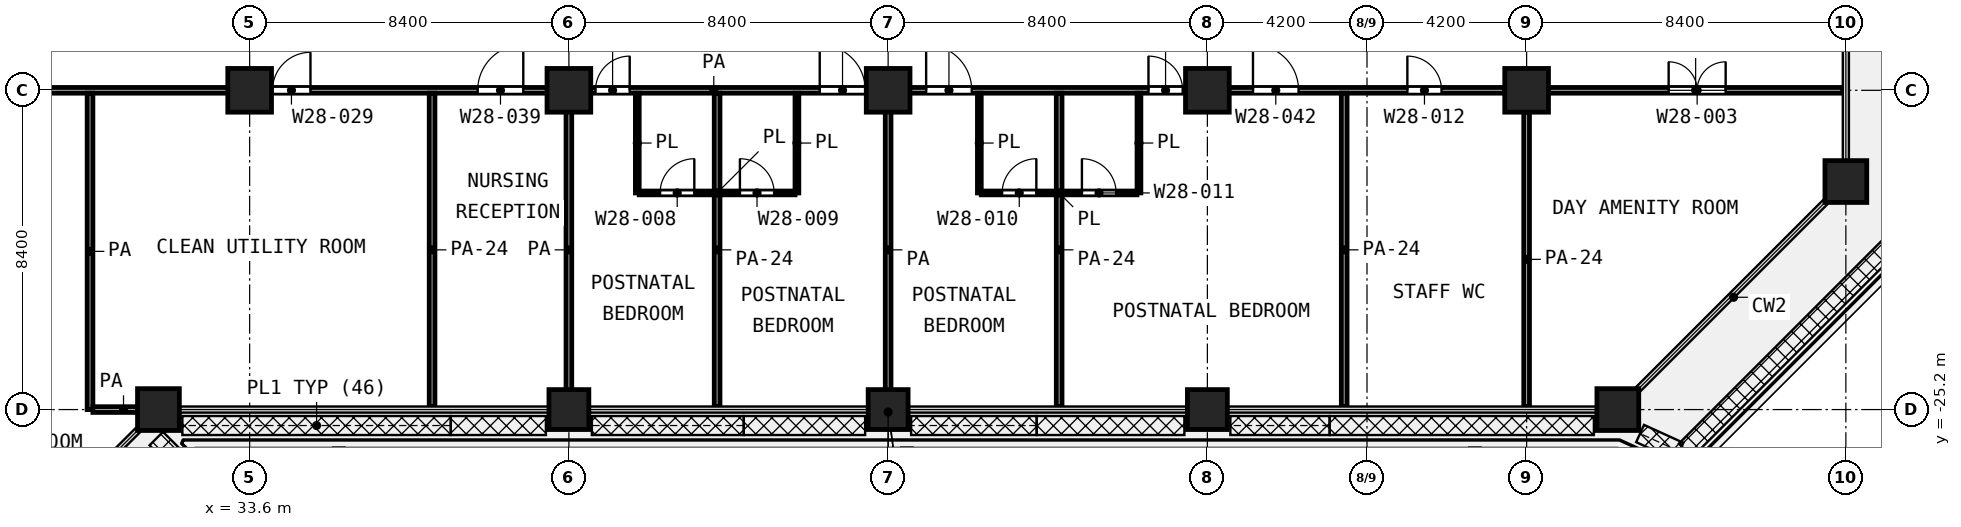
"""IFC4 building model, lengths in metres.
Left out: names, types, materials, properties, quantities, classifications, styles, units other than length and angle.
Written with IfcOpenShell. Run it as: python <this file> out.ifc"""

import sys

from ifc_helpers import new_model, si_unit, direction, frame, frame_2d, origin, origin_2d, place, context, subcontext, project, spatial, rectangle, extrude, element, fill, save


model = new_model("IFC4")
c1 = context("Model", 3, precision=1e-05, world=origin(), true_north=direction((0.0, 1.0)))
c2 = subcontext(c1, "Body", "Model", "MODEL_VIEW")
j1 = project(units=[si_unit("LENGTHUNIT", "METRE"), si_unit("PLANEANGLEUNIT", "RADIAN")], contexts=[c1])
p1 = place(None, origin())
s1 = spatial("IfcSite", under=j1, at=p1, CompositionType="ELEMENT")
p2 = place(p1, origin())
s2 = spatial("IfcBuilding", under=s1, at=p2, CompositionType="ELEMENT")
p3 = place(p2, frame((0.0, 0.0, 145.0)))
s3 = spatial("IfcBuildingStorey", under=s2, at=p3, CompositionType="ELEMENT", Elevation=145.0)
for number, where, z_axis, x_axis in (
    (1, (33.6, -16.8, 0.0), (0.0, 0.0, 1.0), (1.0, 0.0, 0.0)),
    (2, (42.0, -16.8, 0.0), (0.0, 0.0, 1.0), (1.0, 0.0, 0.0)),
    (3, (50.4, -16.8, 0.0), (0.0, 0.0, 1.0), (1.0, 0.0, 0.0)),
    (4, (58.8, -16.8, 0.0), (0.0, 0.0, 1.0), (1.0, 0.0, 0.0)),
    (5, (67.2, -16.8, 0.0), (0.0, 0.0, 1.0), (1.0, 0.0, 0.0)),
):
    element("IfcColumn", number, at=place(p3, frame(where, z_axis=z_axis, x_axis=x_axis)), inside=s3, PredefinedType="COLUMN", context=c2, shape_type="SweptSolid", body=[
        extrude(rectangle(XDim=1.15, YDim=1.15, at=origin_2d()), origin(), (0.0, 0.0, 1.0), 4.2),
    ])
for number, where, z_axis, x_axis in (
    (6, (75.6, -19.2, 0.0), (0.0, 0.0, 1.0), (1.0, 0.0, 0.0)),
    (7, (31.2, -25.2, 0.0), (0.0, 0.0, 1.0), (1.0, 0.0, 0.0)),
):
    element("IfcColumn", number, at=place(p3, frame(where, z_axis=z_axis, x_axis=x_axis)), inside=s3, PredefinedType="COLUMN", context=c2, shape_type="SweptSolid", body=[
        extrude(rectangle(XDim=1.1, YDim=1.1, at=origin_2d()), origin(), (0.0, 0.0, 1.0), 4.2),
    ])
for number, where, z_axis, x_axis in (
    (8, (42.0, -25.2, 0.0), (0.0, 0.0, 1.0), (1.0, 0.0, 0.0)),
    (9, (50.4, -25.2, 0.0), (0.0, 0.0, 1.0), (1.0, 0.0, 0.0)),
    (10, (58.8, -25.2, 0.0), (0.0, 0.0, 1.0), (1.0, 0.0, 0.0)),
):
    element("IfcColumn", number, at=place(p3, frame(where, z_axis=z_axis, x_axis=x_axis)), inside=s3, PredefinedType="COLUMN", context=c2, shape_type="SweptSolid", body=[
        extrude(rectangle(XDim=1.05, YDim=1.05, at=origin_2d()), origin(), (0.0, 0.0, 1.0), 4.2),
    ])
p4 = place(p3, frame((69.6, -25.2, 0.0), z_axis=(0.0, 0.0, 1.0), x_axis=(1.0, 0.0, 0.0)))
e11 = element("IfcColumn", 11, at=p4, inside=s3, PredefinedType="COLUMN", context=c2, shape_type="SweptSolid", body=[
    extrude(rectangle(XDim=1.1, YDim=1.1, at=origin_2d()), origin(), (0.0, 0.0, 1.0), 4.2),
])
p5 = place(p3, frame((43.85, -19.5, 0.0), z_axis=(0.0, 0.0, 1.0), x_axis=(1.0, 0.0, 0.0)))
e12 = element("IfcWall", 12, at=p5, inside=s3, PredefinedType="PARTITIONING", context=c2, shape_type="SweptSolid", body=[
    extrude(rectangle(XDim=4.1, YDim=0.1, at=frame_2d((2.05, 0.0))), origin(), (0.0, 0.0, 1.0), 3.6),
])
p6 = place(p5, frame((0.55, 0.0, 0.0)))
e13 = element("IfcOpeningElement", 13, at=p6, cuts=e12, PredefinedType="OPENING", context=c2, shape_type="SweptSolid", body=[
    extrude(rectangle(XDim=0.9, YDim=2.1, at=frame_2d((0.45, 1.05))), frame((0.0, 0.06, 0.0), z_axis=(0.0, -1.0, 0.0), x_axis=(1.0, 0.0, 0.0)), (0.0, 0.0, 1.0), 0.12),
])
p7 = place(p5, frame((2.65, 0.0, 0.0)))
e14 = element("IfcOpeningElement", 14, at=p7, cuts=e12, PredefinedType="OPENING", context=c2, shape_type="SweptSolid", body=[
    extrude(rectangle(XDim=0.9, YDim=2.1, at=frame_2d((0.45, 1.05))), frame((0.0, 0.06, 0.0), z_axis=(0.0, -1.0, 0.0), x_axis=(1.0, 0.0, 0.0)), (0.0, 0.0, 1.0), 0.12),
])
p8 = place(p3, frame((52.85, -19.5, 0.0), z_axis=(0.0, 0.0, 1.0), x_axis=(1.0, 0.0, 0.0)))
e15 = element("IfcWall", 15, at=p8, inside=s3, PredefinedType="PARTITIONING", context=c2, shape_type="SweptSolid", body=[
    extrude(rectangle(XDim=4.098, YDim=0.1, at=frame_2d((2.049, 0.0))), origin(), (0.0, 0.0, 1.0), 3.6),
])
p9 = place(p8, frame((0.55, 0.0, 0.0)))
e16 = element("IfcOpeningElement", 16, at=p9, cuts=e15, PredefinedType="OPENING", context=c2, shape_type="SweptSolid", body=[
    extrude(rectangle(XDim=0.9, YDim=2.1, at=frame_2d((0.45, 1.05))), frame((0.0, 0.06, 0.0), z_axis=(0.0, -1.0, 0.0), x_axis=(1.0, 0.0, 0.0)), (0.0, 0.0, 1.0), 0.12),
])
p10 = place(p8, frame((2.649, 0.0, 0.0)))
e17 = element("IfcOpeningElement", 17, at=p10, cuts=e15, PredefinedType="OPENING", context=c2, shape_type="SweptSolid", body=[
    extrude(rectangle(XDim=0.9, YDim=2.1, at=frame_2d((0.45, 1.05))), frame((0.0, 0.06, 0.0), z_axis=(0.0, -1.0, 0.0), x_axis=(1.0, 0.0, 0.0)), (0.0, 0.0, 1.0), 0.12),
])
for number, where, z_axis, x_axis in (
    (18, (43.8, -19.5, 0.0), (0.0, 0.0, 1.0), (0.0, 1.0, 0.0)),
    (19, (48.0, -19.5, 0.0), (0.0, 0.0, 1.0), (0.0, 1.0, 0.0)),
    (20, (52.8, -19.5, 0.0), (0.0, 0.0, 1.0), (0.0, 1.0, 0.0)),
):
    element("IfcWall", number, at=place(p3, frame(where, z_axis=z_axis, x_axis=x_axis)), inside=s3, PredefinedType="PARTITIONING", context=c2, shape_type="SweptSolid", body=[
        extrude(rectangle(XDim=2.625, YDim=0.1, at=frame_2d((1.312, 0.0))), origin(), (0.0, 0.0, 1.0), 3.6),
    ])
p11 = place(p3, frame((57.0, -19.499, 0.0), z_axis=(0.0, 0.0, 1.0), x_axis=(0.0, 1.0, 0.0)))
e21 = element("IfcWall", 21, at=p11, inside=s3, PredefinedType="PARTITIONING", context=c2, shape_type="SweptSolid", body=[
    extrude(rectangle(XDim=2.624, YDim=0.1, at=frame_2d((1.312, 0.0))), origin(), (0.0, 0.0, 1.0), 3.6),
])
p12 = place(p3, frame((29.475, -25.2, 0.0), z_axis=(0.0, 0.0, 1.0), x_axis=(1.0, 0.0, 0.0)))
e22 = element("IfcWall", 22, at=p12, inside=s3, PredefinedType="PARTITIONING", context=c2, shape_type="SweptSolid", body=[
    extrude(rectangle(XDim=1.612, YDim=0.15, at=frame_2d((0.806, 0.0))), origin(), (0.0, 0.0, 1.0), 3.6),
])
p13 = place(p3, frame((25.0, -16.8, 0.0), z_axis=(0.0, 0.0, 1.0), x_axis=(1.0, 0.0, 0.0)))
e23 = element("IfcWall", 23, at=p13, inside=s3, PredefinedType="PARTITIONING", context=c2, shape_type="SweptSolid", body=[
    extrude(rectangle(XDim=41.625, YDim=0.15, at=frame_2d((20.812, 0.0))), origin(), (0.0, 0.0, 1.0), 3.6),
])
p14 = place(p13, frame((1.55, 0.0, 0.0)))
e24 = element("IfcOpeningElement", 24, at=p14, cuts=e23, PredefinedType="OPENING", context=c2, shape_type="SweptSolid", body=[
    extrude(rectangle(XDim=1.5, YDim=2.1, at=frame_2d((0.75, 1.05))), frame((0.0, 0.085, 0.0), z_axis=(0.0, -1.0, 0.0), x_axis=(1.0, 0.0, 0.0)), (0.0, 0.0, 1.0), 0.17),
])
p15 = place(p13, frame((9.2, 0.0, 0.0)))
e25 = element("IfcOpeningElement", 25, at=p15, cuts=e23, PredefinedType="OPENING", context=c2, shape_type="SweptSolid", body=[
    extrude(rectangle(XDim=1.0, YDim=2.1, at=frame_2d((0.5, 1.05))), frame((0.0, 0.085, 0.0), z_axis=(0.0, -1.0, 0.0), x_axis=(1.0, 0.0, 0.0)), (0.0, 0.0, 1.0), 0.17),
])
p16 = place(p13, frame((14.6, 0.0, 0.0)))
e26 = element("IfcOpeningElement", 26, at=p16, cuts=e23, PredefinedType="OPENING", context=c2, shape_type="SweptSolid", body=[
    extrude(rectangle(XDim=1.2, YDim=2.1, at=frame_2d((0.6, 1.05))), frame((0.0, 0.085, 0.0), z_axis=(0.0, -1.0, 0.0), x_axis=(1.0, 0.0, 0.0)), (0.0, 0.0, 1.0), 0.17),
])
p17 = place(p13, frame((17.7, 0.0, 0.0)))
e27 = element("IfcOpeningElement", 27, at=p17, cuts=e23, PredefinedType="OPENING", context=c2, shape_type="SweptSolid", body=[
    extrude(rectangle(XDim=0.9, YDim=2.1, at=frame_2d((0.45, 1.05))), frame((0.0, 0.085, 0.0), z_axis=(0.0, -1.0, 0.0), x_axis=(1.0, 0.0, 0.0)), (0.0, 0.0, 1.0), 0.17),
])
p18 = place(p13, frame((23.6, 0.0, 0.0)))
e28 = element("IfcOpeningElement", 28, at=p18, cuts=e23, PredefinedType="OPENING", context=c2, shape_type="SweptSolid", body=[
    extrude(rectangle(XDim=1.2, YDim=2.1, at=frame_2d((0.6, 1.05))), frame((0.0, 0.085, 0.0), z_axis=(0.0, -1.0, 0.0), x_axis=(1.0, 0.0, 0.0)), (0.0, 0.0, 1.0), 0.17),
])
p19 = place(p13, frame((26.4, 0.0, 0.0)))
e29 = element("IfcOpeningElement", 29, at=p19, cuts=e23, PredefinedType="OPENING", context=c2, shape_type="SweptSolid", body=[
    extrude(rectangle(XDim=1.2, YDim=2.1, at=frame_2d((0.6, 1.05))), frame((0.0, 0.085, 0.0), z_axis=(0.0, -1.0, 0.0), x_axis=(1.0, 0.0, 0.0)), (0.0, 0.0, 1.0), 0.17),
])
p20 = place(p13, frame((35.0, 0.0, 0.0)))
e30 = element("IfcOpeningElement", 30, at=p20, cuts=e23, PredefinedType="OPENING", context=c2, shape_type="SweptSolid", body=[
    extrude(rectangle(XDim=1.2, YDim=2.1, at=frame_2d((0.6, 1.05))), frame((0.0, 0.085, 0.0), z_axis=(0.0, -1.0, 0.0), x_axis=(1.0, 0.0, 0.0)), (0.0, 0.0, 1.0), 0.17),
])
p21 = place(p13, frame((32.25, 0.0, 0.0)))
e31 = element("IfcOpeningElement", 31, at=p21, cuts=e23, PredefinedType="OPENING", context=c2, shape_type="SweptSolid", body=[
    extrude(rectangle(XDim=0.9, YDim=2.1, at=frame_2d((0.45, 1.05))), frame((0.0, 0.085, 0.0), z_axis=(0.0, -1.0, 0.0), x_axis=(1.0, 0.0, 0.0)), (0.0, 0.0, 1.0), 0.17),
])
p22 = place(p13, frame((39.062, 0.0, 0.0)))
e32 = element("IfcOpeningElement", 32, at=p22, cuts=e23, PredefinedType="OPENING", context=c2, shape_type="SweptSolid", body=[
    extrude(rectangle(XDim=0.9, YDim=2.1, at=frame_2d((0.45, 1.05))), frame((0.0, 0.085, 0.0), z_axis=(0.0, -1.0, 0.0), x_axis=(1.0, 0.0, 0.0)), (0.0, 0.0, 1.0), 0.17),
])
p23 = place(p3, frame((67.775, -16.8, 0.0), z_axis=(0.0, 0.0, 1.0), x_axis=(1.0, 0.0, 0.0)))
e33 = element("IfcWall", 33, at=p23, inside=s3, PredefinedType="PARTITIONING", context=c2, shape_type="SweptSolid", body=[
    extrude(rectangle(XDim=7.745, YDim=0.15, at=frame_2d((3.873, 0.0))), origin(), (0.0, 0.0, 1.0), 3.6),
])
p24 = place(p23, frame((3.162, 0.0, 0.0)))
e34 = element("IfcOpeningElement", 34, at=p24, cuts=e33, PredefinedType="OPENING", context=c2, shape_type="SweptSolid", body=[
    extrude(rectangle(XDim=1.5, YDim=2.1, at=frame_2d((0.75, 1.05))), frame((0.0, 0.085, 0.0), z_axis=(0.0, -1.0, 0.0), x_axis=(1.0, 0.0, 0.0)), (0.0, 0.0, 1.0), 0.17),
])
p25 = place(p3, frame((29.4, -25.2, 0.0), z_axis=(0.0, 0.0, 1.0), x_axis=(0.0, 1.0, 0.0)))
e35 = element("IfcWall", 35, at=p25, inside=s3, PredefinedType="PARTITIONING", context=c2, shape_type="SweptSolid", body=[
    extrude(rectangle(XDim=8.325, YDim=0.15, at=frame_2d((4.163, 0.0))), origin(), (0.0, 0.0, 1.0), 3.6),
])
p26 = place(p3, frame((38.4, -25.12, 0.0), z_axis=(0.0, 0.0, 1.0), x_axis=(0.0, 1.0, 0.0)))
e36 = element("IfcWall", 36, at=p26, inside=s3, PredefinedType="PARTITIONING", context=c2, shape_type="SweptSolid", body=[
    extrude(rectangle(XDim=8.245, YDim=0.15, at=frame_2d((4.123, 0.0))), origin(), (0.0, 0.0, 1.0), 2.7),
])
p27 = place(p3, frame((42.0, -25.12, 0.0), z_axis=(0.0, 0.0, 1.0), x_axis=(0.0, 1.0, 0.0)))
e37 = element("IfcWall", 37, at=p27, inside=s3, PredefinedType="PARTITIONING", context=c2, shape_type="SweptSolid", body=[
    extrude(rectangle(XDim=8.245, YDim=0.15, at=frame_2d((4.123, 0.0))), origin(), (0.0, 0.0, 1.0), 3.6),
])
p28 = place(p3, frame((45.9, -25.12, 0.0), z_axis=(0.0, 0.0, 1.0), x_axis=(0.0, 1.0, 0.0)))
e38 = element("IfcWall", 38, at=p28, inside=s3, PredefinedType="PARTITIONING", context=c2, shape_type="SweptSolid", body=[
    extrude(rectangle(XDim=8.245, YDim=0.15, at=frame_2d((4.123, 0.0))), origin(), (0.0, 0.0, 1.0), 2.7),
])
p29 = place(p3, frame((50.4, -25.12, 0.0), z_axis=(0.0, 0.0, 1.0), x_axis=(0.0, 1.0, 0.0)))
e39 = element("IfcWall", 39, at=p29, inside=s3, PredefinedType="PARTITIONING", context=c2, shape_type="SweptSolid", body=[
    extrude(rectangle(XDim=8.245, YDim=0.15, at=frame_2d((4.123, 0.0))), origin(), (0.0, 0.0, 1.0), 3.6),
])
for number, where, z_axis, x_axis in (
    (40, (54.9, -25.12, 0.0), (0.0, 0.0, 1.0), (0.0, 1.0, 0.0)),
    (41, (62.4, -25.12, 0.0), (0.0, 0.0, 1.0), (0.0, 1.0, 0.0)),
):
    element("IfcWall", number, at=place(p3, frame(where, z_axis=z_axis, x_axis=x_axis)), inside=s3, PredefinedType="PARTITIONING", context=c2, shape_type="SweptSolid", body=[
        extrude(rectangle(XDim=8.245, YDim=0.15, at=frame_2d((4.123, 0.0))), origin(), (0.0, 0.0, 1.0), 2.7),
    ])
p30 = place(p3, frame((67.2, -25.12, 0.0), z_axis=(0.0, 0.0, 1.0), x_axis=(0.0, 1.0, 0.0)))
e42 = element("IfcWall", 42, at=p30, inside=s3, PredefinedType="PARTITIONING", context=c2, shape_type="SweptSolid", body=[
    extrude(rectangle(XDim=7.745, YDim=0.15, at=frame_2d((3.873, 0.0))), origin(), (0.0, 0.0, 1.0), 2.7),
])
p31 = place(p15, origin())
e43 = element("IfcDoor", 43, at=p31, inside=s3, OperationType="SINGLE_SWING_RIGHT", PredefinedType="DOOR", context=c2, shape_type="SweptSolid", body=[
    extrude(rectangle(XDim=1.0, YDim=2.1, at=frame_2d((0.5, 1.05))), frame((0.0, 0.025, 0.0), z_axis=(0.0, -1.0, 0.0), x_axis=(1.0, 0.0, 0.0)), (0.0, 0.0, 1.0), 0.05),
])
fill(e25, e43)
p32 = place(p16, origin())
e44 = element("IfcDoor", 44, at=p32, inside=s3, OperationType="SINGLE_SWING_RIGHT", PredefinedType="DOOR", context=c2, shape_type="SweptSolid", body=[
    extrude(rectangle(XDim=1.2, YDim=2.1, at=frame_2d((0.6, 1.05))), frame((0.0, 0.025, 0.0), z_axis=(0.0, -1.0, 0.0), x_axis=(1.0, 0.0, 0.0)), (0.0, 0.0, 1.0), 0.05),
])
fill(e26, e44)
p33 = place(p17, origin())
e45 = element("IfcDoor", 45, at=p33, inside=s3, OperationType="SINGLE_SWING_RIGHT", PredefinedType="DOOR", context=c2, shape_type="SweptSolid", body=[
    extrude(rectangle(XDim=0.9, YDim=2.1, at=frame_2d((0.45, 1.05))), frame((0.0, 0.025, 0.0), z_axis=(0.0, -1.0, 0.0), x_axis=(1.0, 0.0, 0.0)), (0.0, 0.0, 1.0), 0.05),
])
fill(e27, e45)
p34 = place(p6, origin())
e46 = element("IfcDoor", 46, at=p34, inside=s3, OperationType="SINGLE_SWING_RIGHT", PredefinedType="DOOR", context=c2, shape_type="SweptSolid", body=[
    extrude(rectangle(XDim=0.9, YDim=2.1, at=frame_2d((0.45, 1.05))), frame((0.0, 0.025, 0.0), z_axis=(0.0, -1.0, 0.0), x_axis=(1.0, 0.0, 0.0)), (0.0, 0.0, 1.0), 0.05),
])
fill(e13, e46)
p35 = place(p18, origin())
e47 = element("IfcDoor", 47, at=p35, inside=s3, OperationType="SINGLE_SWING_LEFT", PredefinedType="DOOR", context=c2, shape_type="SweptSolid", body=[
    extrude(rectangle(XDim=1.2, YDim=2.1, at=frame_2d((0.6, 1.05))), frame((0.0, 0.025, 0.0), z_axis=(0.0, -1.0, 0.0), x_axis=(1.0, 0.0, 0.0)), (0.0, 0.0, 1.0), 0.05),
])
fill(e28, e47)
p36 = place(p7, origin())
e48 = element("IfcDoor", 48, at=p36, inside=s3, OperationType="SINGLE_SWING_LEFT", PredefinedType="DOOR", context=c2, shape_type="SweptSolid", body=[
    extrude(rectangle(XDim=0.9, YDim=2.1, at=frame_2d((0.45, 1.05))), frame((0.0, 0.025, 0.0), z_axis=(0.0, -1.0, 0.0), x_axis=(1.0, 0.0, 0.0)), (0.0, 0.0, 1.0), 0.05),
])
fill(e14, e48)
p37 = place(p19, origin())
e49 = element("IfcDoor", 49, at=p37, inside=s3, OperationType="SINGLE_SWING_LEFT", PredefinedType="DOOR", context=c2, shape_type="SweptSolid", body=[
    extrude(rectangle(XDim=1.2, YDim=2.1, at=frame_2d((0.6, 1.05))), frame((0.0, 0.025, 0.0), z_axis=(0.0, -1.0, 0.0), x_axis=(1.0, 0.0, 0.0)), (0.0, 0.0, 1.0), 0.05),
])
fill(e29, e49)
p38 = place(p9, origin())
e50 = element("IfcDoor", 50, at=p38, inside=s3, OperationType="SINGLE_SWING_RIGHT", PredefinedType="DOOR", context=c2, shape_type="SweptSolid", body=[
    extrude(rectangle(XDim=0.9, YDim=2.1, at=frame_2d((0.45, 1.05))), frame((0.0, 0.025, 0.0), z_axis=(0.0, -1.0, 0.0), x_axis=(1.0, 0.0, 0.0)), (0.0, 0.0, 1.0), 0.05),
])
fill(e16, e50)
p39 = place(p20, origin())
e51 = element("IfcDoor", 51, at=p39, inside=s3, OperationType="SINGLE_SWING_LEFT", PredefinedType="DOOR", context=c2, shape_type="SweptSolid", body=[
    extrude(rectangle(XDim=1.2, YDim=2.1, at=frame_2d((0.6, 1.05))), frame((0.0, 0.025, 0.0), z_axis=(0.0, -1.0, 0.0), x_axis=(1.0, 0.0, 0.0)), (0.0, 0.0, 1.0), 0.05),
])
fill(e30, e51)
p40 = place(p21, origin())
e52 = element("IfcDoor", 52, at=p40, inside=s3, OperationType="SINGLE_SWING_LEFT", PredefinedType="DOOR", context=c2, shape_type="SweptSolid", body=[
    extrude(rectangle(XDim=0.9, YDim=2.1, at=frame_2d((0.45, 1.05))), frame((0.0, 0.025, 0.0), z_axis=(0.0, -1.0, 0.0), x_axis=(1.0, 0.0, 0.0)), (0.0, 0.0, 1.0), 0.05),
])
fill(e31, e52)
p41 = place(p10, origin())
e53 = element("IfcDoor", 53, at=p41, inside=s3, OperationType="SINGLE_SWING_LEFT", PredefinedType="DOOR", context=c2, shape_type="SweptSolid", body=[
    extrude(rectangle(XDim=0.9, YDim=2.1, at=frame_2d((0.45, 1.05))), frame((0.0, 0.025, 0.0), z_axis=(0.0, -1.0, 0.0), x_axis=(1.0, 0.0, 0.0)), (0.0, 0.0, 1.0), 0.05),
])
fill(e17, e53)
p42 = place(p22, origin())
e54 = element("IfcDoor", 54, at=p42, inside=s3, OperationType="SINGLE_SWING_LEFT", PredefinedType="DOOR", context=c2, shape_type="SweptSolid", body=[
    extrude(rectangle(XDim=0.9, YDim=2.1, at=frame_2d((0.45, 1.05))), frame((0.0, 0.025, 0.0), z_axis=(0.0, -1.0, 0.0), x_axis=(1.0, 0.0, 0.0)), (0.0, 0.0, 1.0), 0.05),
])
fill(e32, e54)
p43 = place(p24, origin())
e55 = element("IfcDoor", 55, at=p43, inside=s3, OperationType="DOUBLE_DOOR_SINGLE_SWING", PredefinedType="DOOR", context=c2, shape_type="SweptSolid", body=[
    extrude(rectangle(XDim=1.5, YDim=2.1, at=frame_2d((0.75, 1.05))), frame((0.0, 0.025, 0.0), z_axis=(0.0, -1.0, 0.0), x_axis=(1.0, 0.0, 0.0)), (0.0, 0.0, 1.0), 0.05),
])
fill(e34, e55)
save(model, sys.argv[1])
